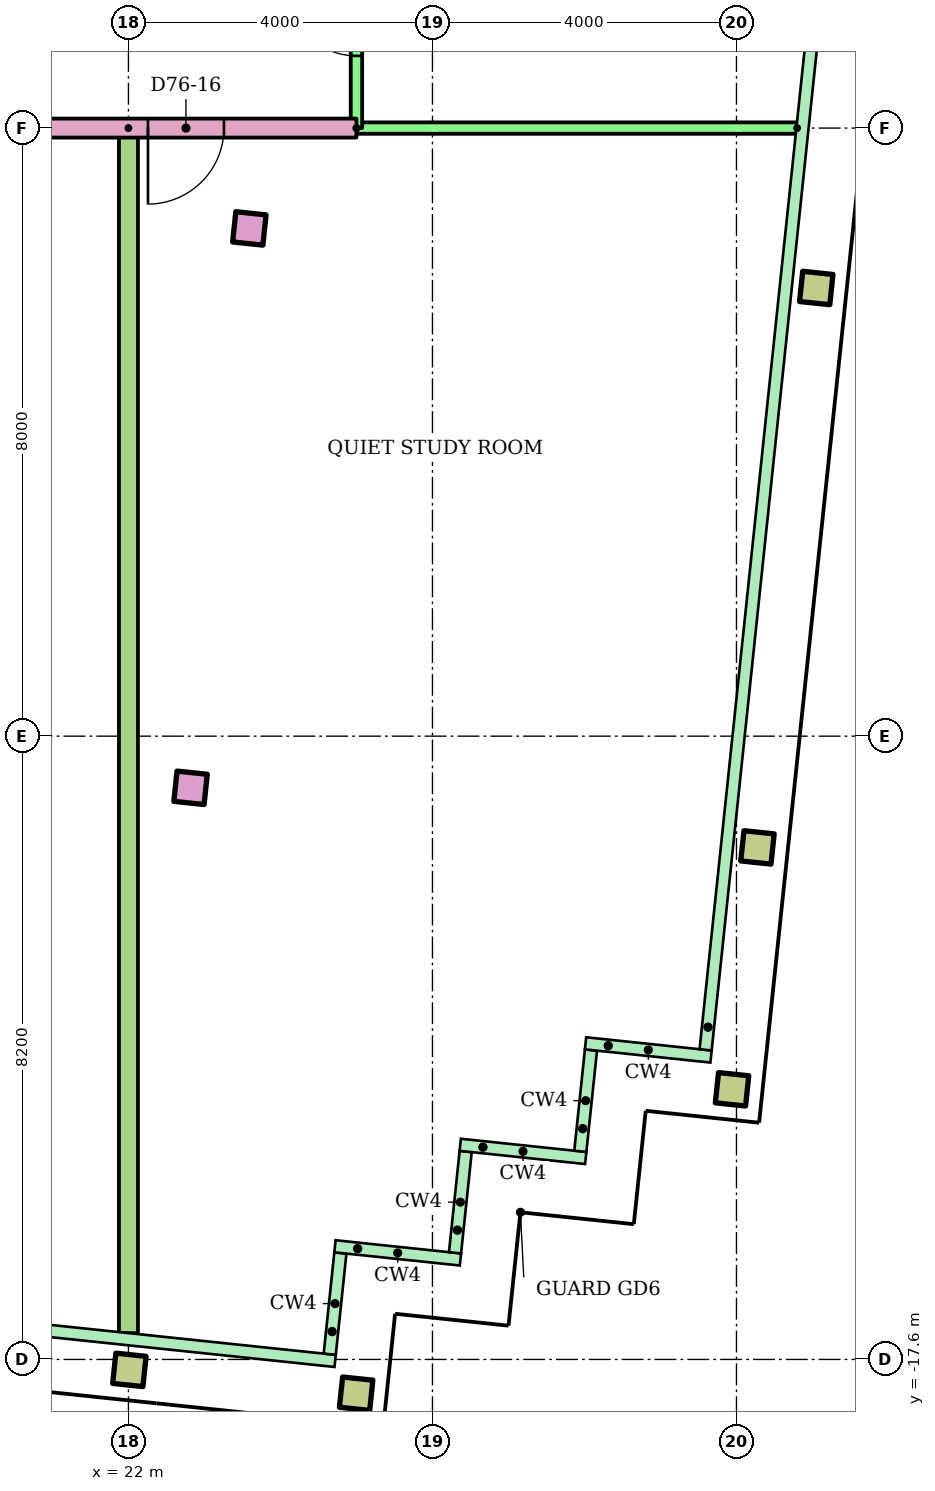
"""IFC4 building model, lengths in metres.
Left out: names, types, materials, properties, quantities, classifications, styles, units other than length and angle.
Written with IfcOpenShell. Run it as: python <this file> out.ifc"""

import sys

from ifc_helpers import new_model, si_unit, direction, frame, frame_2d, origin, origin_2d, place, context, subcontext, project, spatial, rectangle, hollow_rectangle, extrude, element, fill, save


model = new_model("IFC4")
c1 = context("Model", 3, precision=1e-05, world=origin(), true_north=direction((0.0, 1.0)))
c2 = subcontext(c1, "Body", "Model", "MODEL_VIEW")
j1 = project(units=[si_unit("LENGTHUNIT", "METRE"), si_unit("PLANEANGLEUNIT", "RADIAN")], contexts=[c1])
p1 = place(None, origin())
s1 = spatial("IfcSite", under=j1, at=p1, CompositionType="ELEMENT")
p2 = place(p1, origin())
s2 = spatial("IfcBuilding", under=s1, at=p2, CompositionType="ELEMENT")
p3 = place(p2, frame((0.0, 0.0, 294.9)))
s3 = spatial("IfcBuildingStorey", under=s2, at=p3, CompositionType="ELEMENT", Elevation=294.9)
for number, where, z_axis, x_axis in (
    (1, (22.012, -17.737, 0.0), (0.0, 0.0, 1.0), (0.995, -0.105, 0.0)),
    (2, (24.996, -18.051, 0.0), (0.0, 0.0, 1.0), (0.995, -0.105, 0.0)),
    (3, (29.942, -14.046, 0.0), (0.0, 0.0, 1.0), (0.995, -0.105, 0.0)),
):
    element("IfcColumn", number, at=place(p3, frame(where, z_axis=z_axis, x_axis=x_axis)), inside=s3, PredefinedType="COLUMN", context=c2, shape_type="SweptSolid", body=[
        extrude(hollow_rectangle(XDim=0.4, YDim=0.4, WallThickness=0.02, at=origin_2d()), origin(), (0.0, 0.0, 1.0), 3.4),
    ])
p4 = place(p3, frame((22.817, -10.08, 0.0), z_axis=(0.0, 0.0, 1.0), x_axis=(0.994521895368, -0.104528463268, 0.0)))
e4 = element("IfcColumn", 4, at=p4, inside=s3, PredefinedType="COLUMN", context=c2, shape_type="SweptSolid", body=[
    extrude(rectangle(XDim=0.4, YDim=0.4, at=origin_2d()), origin(), (0.0, 0.0, 1.0), 3.4),
])
p5 = place(p3, frame((30.276, -10.864, 0.0), z_axis=(0.0, 0.0, 1.0), x_axis=(0.994521895368, -0.104528463268, 0.0)))
e5 = element("IfcColumn", 5, at=p5, inside=s3, PredefinedType="COLUMN", context=c2, shape_type="SweptSolid", body=[
    extrude(hollow_rectangle(XDim=0.4, YDim=0.4, WallThickness=0.02, at=origin_2d()), origin(), (0.0, 0.0, 1.0), 3.4),
])
p6 = place(p3, frame((23.591, -2.72, 0.0), z_axis=(0.0, 0.0, 1.0), x_axis=(0.994521895368, -0.104528463268, 0.0)))
e6 = element("IfcColumn", 6, at=p6, inside=s3, PredefinedType="COLUMN", context=c2, shape_type="SweptSolid", body=[
    extrude(rectangle(XDim=0.4, YDim=0.4, at=origin_2d()), origin(), (0.0, 0.0, 1.0), 3.4),
])
p7 = place(p3, frame((31.05, -3.504, 0.0), z_axis=(0.0, 0.0, 1.0), x_axis=(0.994521895368, -0.104528463268, 0.0)))
e7 = element("IfcColumn", 7, at=p7, inside=s3, PredefinedType="COLUMN", context=c2, shape_type="SweptSolid", body=[
    extrude(hollow_rectangle(XDim=0.4, YDim=0.4, WallThickness=0.02, at=origin_2d()), origin(), (0.0, 0.0, 1.0), 3.4),
])
p8 = place(p3, frame((25.0, -1.4, 0.0), z_axis=(0.0, 0.0, 1.0), x_axis=(-1.0, 0.0, 0.0)))
e8 = element("IfcWall", 8, at=p8, inside=s3, PredefinedType="PARTITIONING", context=c2, shape_type="SweptSolid", body=[
    extrude(rectangle(XDim=15.0, YDim=0.25, at=frame_2d((7.5, 0.0))), origin(), (0.0, 0.0, 1.0), 2.6),
])
p9 = place(p8, frame((12.5, 0.0, 0.0)))
e9 = element("IfcOpeningElement", 9, at=p9, cuts=e8, PredefinedType="OPENING", context=c2, shape_type="SweptSolid", body=[
    extrude(rectangle(XDim=1.0, YDim=2.1, at=frame_2d((0.5, 1.05))), frame((0.0, 0.135, 0.0), z_axis=(0.0, -1.0, 0.0), x_axis=(1.0, 0.0, 0.0)), (0.0, 0.0, 1.0), 0.27),
])
p10 = place(p8, frame((1.743, 0.0, 0.0)))
e10 = element("IfcOpeningElement", 10, at=p10, cuts=e8, PredefinedType="OPENING", context=c2, shape_type="SweptSolid", body=[
    extrude(rectangle(XDim=1.0, YDim=2.1, at=frame_2d((0.5, 1.05))), frame((0.0, 0.135, 0.0), z_axis=(0.0, -1.0, 0.0), x_axis=(1.0, 0.0, 0.0)), (0.0, 0.0, 1.0), 0.27),
])
p11 = place(p3, frame((30.798, -1.4, 0.0), z_axis=(0.0, 0.0, 1.0), x_axis=(-1.0, 0.0, 0.0)))
e11 = element("IfcWall", 11, at=p11, inside=s3, PredefinedType="PARTITIONING", context=c2, shape_type="SweptSolid", body=[
    extrude(rectangle(XDim=5.798, YDim=0.15, at=frame_2d((2.899, 0.0))), origin(), (0.0, 0.0, 1.0), 2.6),
])
p12 = place(p3, frame((25.0, -1.4, 0.0), z_axis=(0.0, 0.0, 1.0), x_axis=(0.0, 1.0, 0.0)))
e12 = element("IfcWall", 12, at=p12, inside=s3, PredefinedType="PARTITIONING", context=c2, shape_type="SweptSolid", body=[
    extrude(rectangle(XDim=2.8, YDim=0.15, at=frame_2d((1.4, 0.0))), origin(), (0.0, 0.0, 1.0), 2.6),
])
p13 = place(p12, frame((0.95, 0.0, 0.0)))
e13 = element("IfcOpeningElement", 13, at=p13, cuts=e12, PredefinedType="OPENING", context=c2, shape_type="SweptSolid", body=[
    extrude(rectangle(XDim=0.9, YDim=2.1, at=frame_2d((0.45, 1.05))), frame((0.0, 0.085, 0.0), z_axis=(0.0, -1.0, 0.0), x_axis=(1.0, 0.0, 0.0)), (0.0, 0.0, 1.0), 0.17),
])
p14 = place(p3, frame((22.0, -1.4, 0.0), z_axis=(0.0, 0.0, 1.0), x_axis=(0.0, -1.0, 0.0)))
e14 = element("IfcWall", 14, at=p14, inside=s3, PredefinedType="PARTITIONING", context=c2, shape_type="SweptSolid", body=[
    extrude(rectangle(XDim=15.854, YDim=0.25, at=frame_2d((7.927, 0.0))), origin(), (0.0, 0.0, 1.0), 2.6),
])
p15 = place(p10, origin())
e15 = element("IfcDoor", 15, at=p15, inside=s3, OperationType="SINGLE_SWING_RIGHT", PredefinedType="DOOR", context=c2, shape_type="SweptSolid", body=[
    extrude(rectangle(XDim=1.0, YDim=2.1, at=frame_2d((0.5, 1.05))), frame((0.0, 0.025, 0.0), z_axis=(0.0, -1.0, 0.0), x_axis=(1.0, 0.0, 0.0)), (0.0, 0.0, 1.0), 0.05),
])
fill(e10, e15)
p16 = place(p13, origin())
e16 = element("IfcDoor", 16, at=p16, inside=s3, OperationType="SINGLE_SWING_RIGHT", PredefinedType="DOOR", context=c2, shape_type="SweptSolid", body=[
    extrude(rectangle(XDim=0.9, YDim=2.1, at=frame_2d((0.45, 1.05))), frame((0.0, 0.025, 0.0), z_axis=(0.0, -1.0, 0.0), x_axis=(1.0, 0.0, 0.0)), (0.0, 0.0, 1.0), 0.05),
])
fill(e13, e16)
save(model, sys.argv[1])
